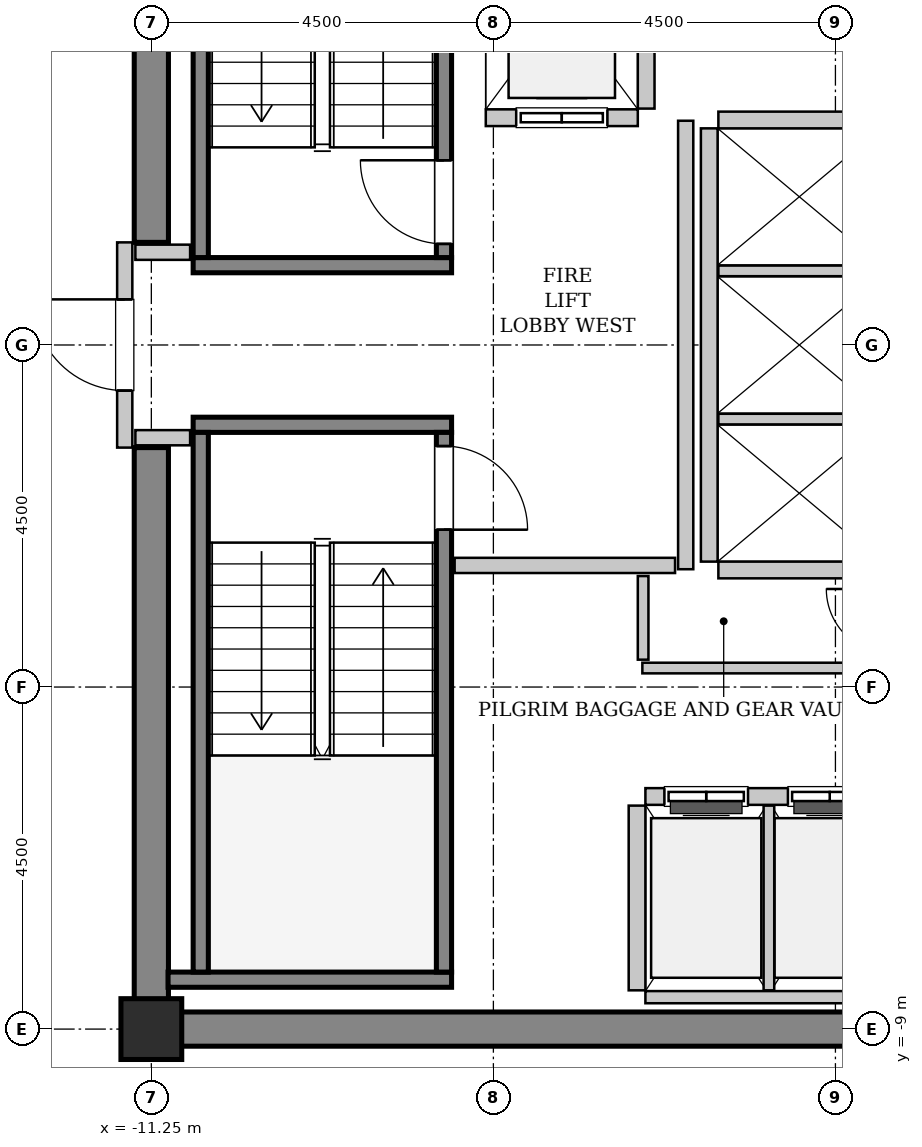
"""IFC4 building model, lengths in metres.
Left out: names, types, materials, properties, quantities, classifications, styles, units other than length and angle.
Written with IfcOpenShell. Run it as: python <this file> out.ifc"""

import sys

from ifc_helpers import new_model, si_unit, direction, frame, frame_2d, origin, origin_2d, place, context, subcontext, project, spatial, rectangle, hollow_rectangle, extrude, source, transform, mapped, element, fill, save


model = new_model("IFC4")
c1 = context("Model", 3, precision=1e-05, world=origin(), true_north=direction((0.0, 1.0)))
c2 = subcontext(c1, "Body", "Model", "MODEL_VIEW")
j1 = project(units=[si_unit("LENGTHUNIT", "METRE"), si_unit("PLANEANGLEUNIT", "RADIAN")], contexts=[c1])
p1 = place(None, origin())
s1 = spatial("IfcSite", under=j1, at=p1, CompositionType="ELEMENT")
p2 = place(p1, origin())
s2 = spatial("IfcBuilding", under=s1, at=p2, CompositionType="ELEMENT")
p3 = place(p2, frame((0.0, 0.0, 225.6)))
s3 = spatial("IfcBuildingStorey", under=s2, at=p3, CompositionType="ELEMENT", Elevation=225.6)
m1 = source(origin(), c2, "Body", "SweptSolid", [
    extrude(rectangle(XDim=9.925, YDim=0.45, at=frame_2d((4.962, 0.0))), origin(), (0.0, 0.0, 1.0), 3.8),
])
p4 = place(p3, frame((-11.475, -9.0, 0.0), z_axis=(0.0, 0.0, 1.0), x_axis=(1.0, 0.0, 0.0)))
e1 = element("IfcWall", 1, at=p4, inside=s3, PredefinedType="SHEAR", context=c2, shape_type="MappedRepresentation", body=[
    mapped(m1, transform((0.0, 0.0, 0.0), x_axis=(1.0, 0.0, 0.0), y_axis=(0.0, 1.0, 0.0), z_axis=(0.0, 0.0, 1.0), scale=1.0)),
])
m2 = source(origin(), c2, "Body", "SweptSolid", [
    extrude(rectangle(XDim=7.425, YDim=0.45, at=frame_2d((3.712, 0.0))), origin(), (0.0, 0.0, 1.0), 3.8),
])
for number, where, z_axis, x_axis in (
    (2, (-11.25, -8.775, 0.0), (0.0, 0.0, 1.0), (0.0, 1.0, 0.0)),
    (3, (-11.25, 1.35, 0.0), (0.0, 0.0, 1.0), (0.0, 1.0, 0.0)),
):
    element("IfcWall", number, at=place(p3, frame(where, z_axis=z_axis, x_axis=x_axis)), inside=s3, PredefinedType="SHEAR", context=c2, shape_type="MappedRepresentation", body=[
        mapped(m2, transform((0.0, 0.0, 0.0), x_axis=(1.0, 0.0, 0.0), y_axis=(0.0, 1.0, 0.0), z_axis=(0.0, 0.0, 1.0), scale=1.0)),
    ])
m3 = source(origin(), c2, "Body", "SweptSolid", [
    extrude(hollow_rectangle(XDim=0.8, YDim=0.8, WallThickness=0.04, InnerFilletRadius=0.04, OuterFilletRadius=0.08, at=origin_2d()), origin(), (0.0, 0.0, 1.0), 3.8),
])
p5 = place(p3, frame((-11.25, -9.0, 0.0), z_axis=(0.0, 0.0, 1.0), x_axis=(1.0, 0.0, 0.0)))
e4 = element("IfcColumn", 4, at=p5, inside=s3, PredefinedType="COLUMN", context=c2, shape_type="MappedRepresentation", body=[
    mapped(m3, transform((0.0, 0.0, 0.0), x_axis=(1.0, 0.0, 0.0), y_axis=(0.0, 1.0, 0.0), z_axis=(0.0, 0.0, 1.0), scale=1.0)),
])
m4 = source(origin(), c2, "Body", "SweptSolid", [
    extrude(rectangle(XDim=3.4, YDim=0.2, at=frame_2d((1.7, 0.0))), origin(), (0.0, 0.0, 1.0), 3.8),
])
p6 = place(p3, frame((-7.3, 1.05, 0.0), z_axis=(0.0, 0.0, 1.0), x_axis=(-1.0, 0.0, 0.0)))
e5 = element("IfcWall", 5, at=p6, inside=s3, PredefinedType="SOLIDWALL", context=c2, shape_type="MappedRepresentation", body=[
    mapped(m4, transform((0.0, 0.0, 0.0), x_axis=(1.0, 0.0, 0.0), y_axis=(0.0, 1.0, 0.0), z_axis=(0.0, 0.0, 1.0), scale=1.0)),
])
m5 = source(origin(), c2, "Body", "SweptSolid", [
    extrude(rectangle(XDim=7.1, YDim=0.2, at=frame_2d((3.55, 0.0))), origin(), (0.0, 0.0, 1.0), 3.8),
])
p7 = place(p3, frame((-7.4, 1.15, 0.0), z_axis=(0.0, 0.0, 1.0), x_axis=(0.0, 1.0, 0.0)))
e6 = element("IfcWall", 6, at=p7, inside=s3, PredefinedType="SOLIDWALL", context=c2, shape_type="MappedRepresentation", body=[
    mapped(m5, transform((0.0, 0.0, 0.0), x_axis=(1.0, 0.0, 0.0), y_axis=(0.0, 1.0, 0.0), z_axis=(0.0, 0.0, 1.0), scale=1.0)),
])
p8 = place(p7, frame((0.18, 0.0, 0.0)))
e7 = element("IfcOpeningElement", 7, at=p8, cuts=e6, PredefinedType="OPENING", context=c2, shape_type="SweptSolid", body=[
    extrude(rectangle(XDim=1.1, YDim=2.15, at=frame_2d((0.55, 1.075))), frame((0.0, 0.11, 0.0), z_axis=(0.0, -1.0, 0.0), x_axis=(1.0, 0.0, 0.0)), (0.0, 0.0, 1.0), 0.22),
])
p9 = place(p3, frame((-10.6, 1.15, 0.0), z_axis=(0.0, 0.0, 1.0), x_axis=(0.0, 1.0, 0.0)))
e8 = element("IfcWall", 8, at=p9, inside=s3, PredefinedType="SOLIDWALL", context=c2, shape_type="MappedRepresentation", body=[
    mapped(m5, transform((0.0, 0.0, 0.0), x_axis=(1.0, 0.0, 0.0), y_axis=(0.0, 1.0, 0.0), z_axis=(0.0, 0.0, 1.0), scale=1.0)),
])
p10 = place(p3, frame((-10.7, -1.05, 0.0), z_axis=(0.0, 0.0, 1.0), x_axis=(1.0, 0.0, 0.0)))
e9 = element("IfcWall", 9, at=p10, inside=s3, PredefinedType="SOLIDWALL", context=c2, shape_type="MappedRepresentation", body=[
    mapped(m4, transform((0.0, 0.0, 0.0), x_axis=(1.0, 0.0, 0.0), y_axis=(0.0, 1.0, 0.0), z_axis=(0.0, 0.0, 1.0), scale=1.0)),
])
m6 = source(origin(), c2, "Body", "SweptSolid", [
    extrude(rectangle(XDim=3.73, YDim=0.2, at=frame_2d((1.865, 0.0))), origin(), (0.0, 0.0, 1.0), 3.8),
])
p11 = place(p3, frame((-11.03, -8.35, 0.0), z_axis=(0.0, 0.0, 1.0), x_axis=(1.0, 0.0, 0.0)))
e10 = element("IfcWall", 10, at=p11, inside=s3, PredefinedType="SOLIDWALL", context=c2, shape_type="MappedRepresentation", body=[
    mapped(m6, transform((0.0, 0.0, 0.0), x_axis=(1.0, 0.0, 0.0), y_axis=(0.0, 1.0, 0.0), z_axis=(0.0, 0.0, 1.0), scale=1.0)),
])
p12 = place(p3, frame((-10.6, -1.15, 0.0), z_axis=(0.0, 0.0, 1.0), x_axis=(0.0, -1.0, 0.0)))
e11 = element("IfcWall", 11, at=p12, inside=s3, PredefinedType="SOLIDWALL", context=c2, shape_type="MappedRepresentation", body=[
    mapped(m5, transform((0.0, 0.0, 0.0), x_axis=(1.0, 0.0, 0.0), y_axis=(0.0, 1.0, 0.0), z_axis=(0.0, 0.0, 1.0), scale=1.0)),
])
p13 = place(p3, frame((-7.4, -1.15, 0.0), z_axis=(0.0, 0.0, 1.0), x_axis=(0.0, -1.0, 0.0)))
e12 = element("IfcWall", 12, at=p13, inside=s3, PredefinedType="SOLIDWALL", context=c2, shape_type="MappedRepresentation", body=[
    mapped(m5, transform((0.0, 0.0, 0.0), x_axis=(1.0, 0.0, 0.0), y_axis=(0.0, 1.0, 0.0), z_axis=(0.0, 0.0, 1.0), scale=1.0)),
])
p14 = place(p13, frame((0.18, 0.0, 0.0)))
e13 = element("IfcOpeningElement", 13, at=p14, cuts=e12, PredefinedType="OPENING", context=c2, shape_type="SweptSolid", body=[
    extrude(rectangle(XDim=1.1, YDim=2.15, at=frame_2d((0.55, 1.075))), frame((0.0, 0.11, 0.0), z_axis=(0.0, -1.0, 0.0), x_axis=(1.0, 0.0, 0.0)), (0.0, 0.0, 1.0), 0.22),
])
m7 = source(origin(), c2, "Body", "SweptSolid", [
    extrude(rectangle(XDim=2.0, YDim=0.22, at=frame_2d((1.0, 0.0))), origin(), (0.0, 0.0, 1.0), 3.535),
])
p15 = place(p3, frame((-6.85, 2.99, 0.0), z_axis=(0.0, 0.0, 1.0), x_axis=(1.0, 0.0, 0.0)))
e14 = element("IfcWall", 14, at=p15, inside=s3, PredefinedType="SOLIDWALL", context=c2, shape_type="MappedRepresentation", body=[
    mapped(m7, transform((0.0, 0.0, 0.0), x_axis=(1.0, 0.0, 0.0), y_axis=(0.0, 1.0, 0.0), z_axis=(0.0, 0.0, 1.0), scale=1.0)),
])
p16 = place(p15, frame((0.4, 0.0, 0.0)))
e15 = element("IfcOpeningElement", 15, at=p16, cuts=e14, PredefinedType="OPENING", context=c2, shape_type="SweptSolid", body=[
    extrude(rectangle(XDim=1.2, YDim=2.2, at=frame_2d((0.6, 1.1))), frame((0.0, 0.12, 0.0), z_axis=(0.0, -1.0, 0.0), x_axis=(1.0, 0.0, 0.0)), (0.0, 0.0, 1.0), 0.24),
])
m8 = source(origin(), c2, "Body", "SweptSolid", [
    extrude(rectangle(XDim=2.68, YDim=0.22, at=frame_2d((1.34, 0.0))), origin(), (0.0, 0.0, 1.0), 3.535),
])
p17 = place(p3, frame((-4.74, 3.11, 0.0), z_axis=(0.0, 0.0, 1.0), x_axis=(0.0, 1.0, 0.0)))
e16 = element("IfcWall", 16, at=p17, inside=s3, PredefinedType="SOLIDWALL", context=c2, shape_type="MappedRepresentation", body=[
    mapped(m8, transform((0.0, 0.0, 0.0), x_axis=(1.0, 0.0, 0.0), y_axis=(0.0, 1.0, 0.0), z_axis=(0.0, 0.0, 1.0), scale=1.0)),
])
m9 = source(origin(), c2, "Body", "SweptSolid", [
    extrude(rectangle(XDim=3.2, YDim=0.22, at=frame_2d((1.6, 0.0))), origin(), (0.0, 0.0, 1.0), 3.535),
])
p18 = place(p3, frame((-1.55, -5.94, 0.0), z_axis=(0.0, 0.0, 1.0), x_axis=(-1.0, 0.0, 0.0)))
e17 = element("IfcWall", 17, at=p18, inside=s3, PredefinedType="SOLIDWALL", context=c2, shape_type="MappedRepresentation", body=[
    mapped(m9, transform((0.0, 0.0, 0.0), x_axis=(1.0, 0.0, 0.0), y_axis=(0.0, 1.0, 0.0), z_axis=(0.0, 0.0, 1.0), scale=1.0)),
])
p19 = place(p18, frame((1.85, 0.0, 0.0)))
e18 = element("IfcOpeningElement", 18, at=p19, cuts=e17, PredefinedType="OPENING", context=c2, shape_type="SweptSolid", body=[
    extrude(rectangle(XDim=1.1, YDim=2.2, at=frame_2d((0.55, 1.1))), frame((0.0, 0.12, 0.0), z_axis=(0.0, -1.0, 0.0), x_axis=(1.0, 0.0, 0.0)), (0.0, 0.0, 1.0), 0.24),
])
p20 = place(p18, frame((0.225, 0.0, 0.0)))
e19 = element("IfcOpeningElement", 19, at=p20, cuts=e17, PredefinedType="OPENING", context=c2, shape_type="SweptSolid", body=[
    extrude(rectangle(XDim=1.1, YDim=2.2, at=frame_2d((0.55, 1.1))), frame((0.0, 0.12, 0.0), z_axis=(0.0, -1.0, 0.0), x_axis=(1.0, 0.0, 0.0)), (0.0, 0.0, 1.0), 0.24),
])
m10 = source(origin(), c2, "Body", "SweptSolid", [
    extrude(rectangle(XDim=3.2, YDim=0.16, at=frame_2d((1.6, 0.0))), origin(), (0.0, 0.0, 1.0), 2.625),
])
p21 = place(p3, frame((-4.75, -8.58, 0.0), z_axis=(0.0, 0.0, 1.0), x_axis=(1.0, 0.0, 0.0)))
e20 = element("IfcWall", 20, at=p21, inside=s3, PredefinedType="PARTITIONING", context=c2, shape_type="MappedRepresentation", body=[
    mapped(m10, transform((0.0, 0.0, 0.0), x_axis=(1.0, 0.0, 0.0), y_axis=(0.0, 1.0, 0.0), z_axis=(0.0, 0.0, 1.0), scale=1.0)),
])
m11 = source(origin(), c2, "Body", "SweptSolid", [
    extrude(rectangle(XDim=2.43, YDim=0.22, at=frame_2d((1.215, 0.0))), origin(), (0.0, 0.0, 1.0), 3.535),
])
p22 = place(p3, frame((-4.86, -6.06, 0.0), z_axis=(0.0, 0.0, 1.0), x_axis=(0.0, -1.0, 0.0)))
e21 = element("IfcWall", 21, at=p22, inside=s3, PredefinedType="SOLIDWALL", context=c2, shape_type="MappedRepresentation", body=[
    mapped(m11, transform((0.0, 0.0, 0.0), x_axis=(1.0, 0.0, 0.0), y_axis=(0.0, 1.0, 0.0), z_axis=(0.0, 0.0, 1.0), scale=1.0)),
])
m12 = source(origin(), c2, "Body", "SweptSolid", [
    extrude(rectangle(XDim=2.43, YDim=0.14, at=frame_2d((1.215, 0.0))), origin(), (0.0, 0.0, 1.0), 3.535),
])
p23 = place(p3, frame((-3.125, -8.49, 0.0), z_axis=(0.0, 0.0, 1.0), x_axis=(0.0, 1.0, 0.0)))
e22 = element("IfcWall", 22, at=p23, inside=s3, PredefinedType="PARTITIONING", context=c2, shape_type="MappedRepresentation", body=[
    mapped(m12, transform((0.0, 0.0, 0.0), x_axis=(1.0, 0.0, 0.0), y_axis=(0.0, 1.0, 0.0), z_axis=(0.0, 0.0, 1.0), scale=1.0)),
])
m13 = source(origin(), c2, "Body", "SweptSolid", [
    extrude(rectangle(XDim=5.7, YDim=0.22, at=frame_2d((2.85, 0.0))), origin(), (0.0, 0.0, 1.0), 3.535),
])
p24 = place(p3, frame((-3.91, 2.85, 0.0), z_axis=(0.0, 0.0, 1.0), x_axis=(0.0, -1.0, 0.0)))
e23 = element("IfcWall", 23, at=p24, inside=s3, PredefinedType="SOLIDWALL", context=c2, shape_type="MappedRepresentation", body=[
    mapped(m13, transform((0.0, 0.0, 0.0), x_axis=(1.0, 0.0, 0.0), y_axis=(0.0, 1.0, 0.0), z_axis=(0.0, 0.0, 1.0), scale=1.0)),
])
m14 = source(origin(), c2, "Body", "SweptSolid", [
    extrude(rectangle(XDim=2.13, YDim=0.22, at=frame_2d((1.065, 0.0))), origin(), (0.0, 0.0, 1.0), 3.535),
])
p25 = place(p3, frame((-3.79, -2.96, 0.0), z_axis=(0.0, 0.0, 1.0), x_axis=(1.0, 0.0, 0.0)))
e24 = element("IfcWall", 24, at=p25, inside=s3, PredefinedType="SOLIDWALL", context=c2, shape_type="MappedRepresentation", body=[
    mapped(m14, transform((0.0, 0.0, 0.0), x_axis=(1.0, 0.0, 0.0), y_axis=(0.0, 1.0, 0.0), z_axis=(0.0, 0.0, 1.0), scale=1.0)),
])
m15 = source(origin(), c2, "Body", "SweptSolid", [
    extrude(rectangle(XDim=2.13, YDim=0.14, at=frame_2d((1.065, 0.0))), origin(), (0.0, 0.0, 1.0), 3.535),
])
for number, where, z_axis, x_axis in (
    (25, (-3.79, -0.975, 0.0), (0.0, 0.0, 1.0), (1.0, 0.0, 0.0)),
    (26, (-3.79, 0.975, 0.0), (0.0, 0.0, 1.0), (1.0, 0.0, 0.0)),
):
    element("IfcWall", number, at=place(p3, frame(where, z_axis=z_axis, x_axis=x_axis)), inside=s3, PredefinedType="PARTITIONING", context=c2, shape_type="MappedRepresentation", body=[
        mapped(m15, transform((0.0, 0.0, 0.0), x_axis=(1.0, 0.0, 0.0), y_axis=(0.0, 1.0, 0.0), z_axis=(0.0, 0.0, 1.0), scale=1.0)),
    ])
p26 = place(p3, frame((-1.66, 2.96, 0.0), z_axis=(0.0, 0.0, 1.0), x_axis=(-1.0, 0.0, 0.0)))
e27 = element("IfcWall", 27, at=p26, inside=s3, PredefinedType="SOLIDWALL", context=c2, shape_type="MappedRepresentation", body=[
    mapped(m14, transform((0.0, 0.0, 0.0), x_axis=(1.0, 0.0, 0.0), y_axis=(0.0, 1.0, 0.0), z_axis=(0.0, 0.0, 1.0), scale=1.0)),
])
m16 = source(origin(), c2, "Body", "SweptSolid", [
    extrude(rectangle(XDim=2.7, YDim=0.2, at=frame_2d((1.35, 0.0))), origin(), (0.0, 0.0, 1.0), 2.625),
])
p27 = place(p3, frame((-11.6, -1.35, 0.0), z_axis=(0.0, 0.0, 1.0), x_axis=(0.0, 1.0, 0.0)))
e28 = element("IfcWall", 28, at=p27, inside=s3, PredefinedType="PARTITIONING", context=c2, shape_type="MappedRepresentation", body=[
    mapped(m16, transform((0.0, 0.0, 0.0), x_axis=(1.0, 0.0, 0.0), y_axis=(0.0, 1.0, 0.0), z_axis=(0.0, 0.0, 1.0), scale=1.0)),
])
p28 = place(p27, frame((0.75, 0.0, 0.0)))
e29 = element("IfcOpeningElement", 29, at=p28, cuts=e28, PredefinedType="OPENING", context=c2, shape_type="SweptSolid", body=[
    extrude(rectangle(XDim=1.2, YDim=2.15, at=frame_2d((0.6, 1.075))), frame((0.0, 0.11, 0.0), z_axis=(0.0, -1.0, 0.0), x_axis=(1.0, 0.0, 0.0)), (0.0, 0.0, 1.0), 0.22),
])
m17 = source(origin(), c2, "Body", "SweptSolid", [
    extrude(rectangle(XDim=5.9, YDim=0.2, at=frame_2d((2.95, 0.0))), origin(), (0.0, 0.0, 1.0), 3.535),
])
p29 = place(p3, frame((-4.22, -2.95, 0.0), z_axis=(0.0, 0.0, 1.0), x_axis=(0.0, 1.0, 0.0)))
e30 = element("IfcWall", 30, at=p29, inside=s3, PredefinedType="PARTITIONING", context=c2, shape_type="MappedRepresentation", body=[
    mapped(m17, transform((0.0, 0.0, 0.0), x_axis=(1.0, 0.0, 0.0), y_axis=(0.0, 1.0, 0.0), z_axis=(0.0, 0.0, 1.0), scale=1.0)),
])
m18 = source(origin(), c2, "Body", "SweptSolid", [
    extrude(rectangle(XDim=2.9, YDim=0.2, at=frame_2d((1.45, 0.0))), origin(), (0.0, 0.0, 1.0), 3.535),
])
p30 = place(p3, frame((-7.26, -2.9, 0.0), z_axis=(0.0, 0.0, 1.0), x_axis=(1.0, 0.0, 0.0)))
e31 = element("IfcWall", 31, at=p30, inside=s3, PredefinedType="PARTITIONING", context=c2, shape_type="MappedRepresentation", body=[
    mapped(m18, transform((0.0, 0.0, 0.0), x_axis=(1.0, 0.0, 0.0), y_axis=(0.0, 1.0, 0.0), z_axis=(0.0, 0.0, 1.0), scale=1.0)),
])
m19 = source(origin(), c2, "Body", "SweptSolid", [
    extrude(rectangle(XDim=0.72, YDim=0.2, at=frame_2d((0.36, 0.0))), origin(), (0.0, 0.0, 1.0), 3.535),
])
for number, where, z_axis, x_axis in (
    (32, (-11.46, 1.22, 0.0), (0.0, 0.0, 1.0), (1.0, 0.0, 0.0)),
    (33, (-11.46, -1.22, 0.0), (0.0, 0.0, 1.0), (1.0, 0.0, 0.0)),
):
    element("IfcWall", number, at=place(p3, frame(where, z_axis=z_axis, x_axis=x_axis)), inside=s3, PredefinedType="PARTITIONING", context=c2, shape_type="MappedRepresentation", body=[
        mapped(m19, transform((0.0, 0.0, 0.0), x_axis=(1.0, 0.0, 0.0), y_axis=(0.0, 1.0, 0.0), z_axis=(0.0, 0.0, 1.0), scale=1.0)),
    ])
m20 = source(origin(), c2, "Body", "SweptSolid", [
    extrude(rectangle(XDim=3.15, YDim=0.14, at=frame_2d((1.575, 0.0))), origin(), (0.0, 0.0, 1.0), 3.535),
])
p31 = place(p3, frame((-4.79, -4.25, 0.0), z_axis=(0.0, 0.0, 1.0), x_axis=(1.0, 0.0, 0.0)))
e34 = element("IfcWall", 34, at=p31, inside=s3, PredefinedType="PARTITIONING", context=c2, shape_type="MappedRepresentation", body=[
    mapped(m20, transform((0.0, 0.0, 0.0), x_axis=(1.0, 0.0, 0.0), y_axis=(0.0, 1.0, 0.0), z_axis=(0.0, 0.0, 1.0), scale=1.0)),
])
m21 = source(origin(), c2, "Body", "SweptSolid", [
    extrude(rectangle(XDim=1.1, YDim=0.14, at=frame_2d((0.55, 0.0))), origin(), (0.0, 0.0, 1.0), 3.535),
])
p32 = place(p3, frame((-4.78, -4.14, 0.0), z_axis=(0.0, 0.0, 1.0), x_axis=(0.0, 1.0, 0.0)))
e35 = element("IfcWall", 35, at=p32, inside=s3, PredefinedType="PARTITIONING", context=c2, shape_type="MappedRepresentation", body=[
    mapped(m21, transform((0.0, 0.0, 0.0), x_axis=(1.0, 0.0, 0.0), y_axis=(0.0, 1.0, 0.0), z_axis=(0.0, 0.0, 1.0), scale=1.0)),
])
m22 = source(origin(), c2, "Body", "SweptSolid", [
    extrude(rectangle(XDim=1.1, YDim=2.15, at=frame_2d((0.55, 1.075))), frame((0.0, 0.025, 0.0), z_axis=(0.0, -1.0, 0.0), x_axis=(1.0, 0.0, 0.0)), (0.0, 0.0, 1.0), 0.05),
])
p33 = place(p8, origin())
e36 = element("IfcDoor", 36, at=p33, inside=s3, OperationType="SINGLE_SWING_RIGHT", PredefinedType="DOOR", context=c2, shape_type="MappedRepresentation", body=[
    mapped(m22, transform((0.0, 0.0, 0.0), x_axis=(1.0, 0.0, 0.0), y_axis=(0.0, 1.0, 0.0), z_axis=(0.0, 0.0, 1.0), scale=1.0)),
])
fill(e7, e36)
p34 = place(p14, origin())
e37 = element("IfcDoor", 37, at=p34, inside=s3, OperationType="SINGLE_SWING_RIGHT", PredefinedType="DOOR", context=c2, shape_type="MappedRepresentation", body=[
    mapped(m22, transform((0.0, 0.0, 0.0), x_axis=(1.0, 0.0, 0.0), y_axis=(0.0, 1.0, 0.0), z_axis=(0.0, 0.0, 1.0), scale=1.0)),
])
fill(e13, e37)
m23 = source(origin(), c2, "Body", "SweptSolid", [
    extrude(rectangle(XDim=1.2, YDim=2.2, at=frame_2d((0.6, 1.1))), frame((0.0, 0.025, 0.0), z_axis=(0.0, -1.0, 0.0), x_axis=(1.0, 0.0, 0.0)), (0.0, 0.0, 1.0), 0.05),
])
p35 = place(p16, origin())
e38 = element("IfcDoor", 38, at=p35, inside=s3, OperationType="SLIDING_TO_LEFT", PredefinedType="DOOR", context=c2, shape_type="MappedRepresentation", body=[
    mapped(m23, transform((0.0, 0.0, 0.0), x_axis=(1.0, 0.0, 0.0), y_axis=(0.0, 1.0, 0.0), z_axis=(0.0, 0.0, 1.0), scale=1.0)),
])
fill(e15, e38)
m24 = source(origin(), c2, "Body", "SweptSolid", [
    extrude(rectangle(XDim=1.1, YDim=2.2, at=frame_2d((0.55, 1.1))), frame((0.0, 0.025, 0.0), z_axis=(0.0, -1.0, 0.0), x_axis=(1.0, 0.0, 0.0)), (0.0, 0.0, 1.0), 0.05),
])
p36 = place(p19, origin())
e39 = element("IfcDoor", 39, at=p36, inside=s3, OperationType="DOUBLE_DOOR_SLIDING", PredefinedType="DOOR", context=c2, shape_type="MappedRepresentation", body=[
    mapped(m24, transform((0.0, 0.0, 0.0), x_axis=(1.0, 0.0, 0.0), y_axis=(0.0, 1.0, 0.0), z_axis=(0.0, 0.0, 1.0), scale=1.0)),
])
fill(e18, e39)
p37 = place(p20, origin())
e40 = element("IfcDoor", 40, at=p37, inside=s3, OperationType="DOUBLE_DOOR_SLIDING", PredefinedType="DOOR", context=c2, shape_type="MappedRepresentation", body=[
    mapped(m24, transform((0.0, 0.0, 0.0), x_axis=(1.0, 0.0, 0.0), y_axis=(0.0, 1.0, 0.0), z_axis=(0.0, 0.0, 1.0), scale=1.0)),
])
fill(e19, e40)
m25 = source(origin(), c2, "Body", "SweptSolid", [
    extrude(rectangle(XDim=1.2, YDim=2.15, at=frame_2d((0.6, 1.075))), frame((0.0, 0.025, 0.0), z_axis=(0.0, -1.0, 0.0), x_axis=(1.0, 0.0, 0.0)), (0.0, 0.0, 1.0), 0.05),
])
p38 = place(p28, origin())
e41 = element("IfcDoor", 41, at=p38, inside=s3, OperationType="SINGLE_SWING_RIGHT", PredefinedType="DOOR", context=c2, shape_type="MappedRepresentation", body=[
    mapped(m25, transform((0.0, 0.0, 0.0), x_axis=(1.0, 0.0, 0.0), y_axis=(0.0, 1.0, 0.0), z_axis=(0.0, 0.0, 1.0), scale=1.0)),
])
fill(e29, e41)
save(model, sys.argv[1])
